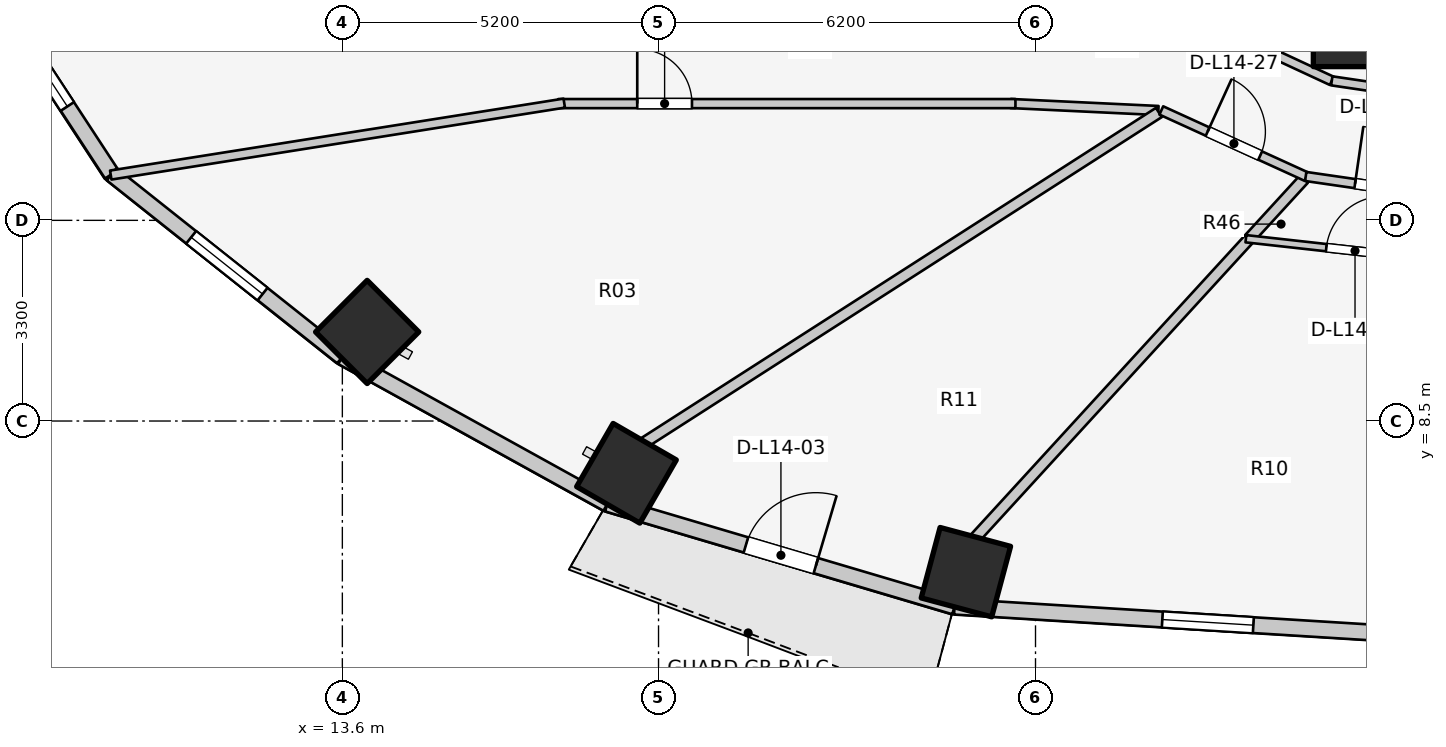
"""IFC4 building model, lengths in metres.
Left out: names, types, materials, properties, quantities, classifications, styles, units other than length and angle.
Written with IfcOpenShell. Run it as: python <this file> out.ifc"""

import sys

from ifc_helpers import new_model, si_unit, direction, frame, frame_2d, origin, origin_2d, place, context, subcontext, project, spatial, rectangle, extrude, element, fill, save


model = new_model("IFC4")
c1 = context("Model", 3, precision=1e-05, world=origin(), true_north=direction((0.0, 1.0)))
c2 = subcontext(c1, "Body", "Model", "MODEL_VIEW")
j1 = project(units=[si_unit("LENGTHUNIT", "METRE"), si_unit("PLANEANGLEUNIT", "RADIAN")], contexts=[c1])
p1 = place(None, origin())
s1 = spatial("IfcSite", under=j1, at=p1, CompositionType="ELEMENT")
p2 = place(p1, origin())
s2 = spatial("IfcBuilding", under=s1, at=p2, CompositionType="ELEMENT")
p3 = place(p2, frame((0.0, 0.0, 49.3)))
s3 = spatial("IfcBuildingStorey", under=s2, at=p3, CompositionType="ELEMENT", Elevation=49.3)
for number, where, z_axis, x_axis in (
    (1, (14.008, 9.965, 0.0), (0.0, 0.0, 1.0), (-0.707, -0.707, 0.0)),
    (2, (18.273, 7.641, 0.0), (0.0, 0.0, 1.0), (-0.5, -0.866, 0.0)),
):
    element("IfcColumn", number, at=place(p3, frame(where, z_axis=z_axis, x_axis=x_axis)), inside=s3, PredefinedType="COLUMN", context=c2, shape_type="SweptSolid", body=[
        extrude(rectangle(XDim=1.2, YDim=1.2, at=origin_2d()), origin(), (0.0, 0.0, 1.0), 3.1),
    ])
p4 = place(p3, frame((30.069, 14.828, 0.0), z_axis=(0.0, 0.0, 1.0), x_axis=(1.0, 0.0, 0.0)))
e3 = element("IfcColumn", 3, at=p4, inside=s3, PredefinedType="COLUMN", context=c2, shape_type="SweptSolid", body=[
    extrude(rectangle(XDim=1.0, YDim=1.0, at=origin_2d()), origin(), (0.0, 0.0, 1.0), 3.1),
])
p5 = place(p3, frame((23.855, 6.014, 0.0), z_axis=(0.0, 0.0, 1.0), x_axis=(-0.258819045103, -0.965925826289, 0.0)))
e4 = element("IfcColumn", 4, at=p5, inside=s3, PredefinedType="COLUMN", context=c2, shape_type="SweptSolid", body=[
    extrude(rectangle(XDim=1.2, YDim=1.2, at=origin_2d()), origin(), (0.0, 0.0, 1.0), 3.1),
])
p6 = place(p3, frame((7.033, 16.795, 0.0), z_axis=(0.0, 0.0, 1.0), x_axis=(0.547702757047, -0.836672988642, 0.0)))
e5 = element("IfcWall", 5, at=p6, inside=s3, PredefinedType="STANDARD", context=c2, shape_type="SweptSolid", body=[
    extrude(rectangle(XDim=5.062, YDim=0.26, at=frame_2d((2.531, 0.0))), origin(), (0.0, 0.0, 1.0), 2.85),
])
p7 = place(p6, frame((1.331, 0.0, 0.75)))
e6 = element("IfcOpeningElement", 6, at=p7, cuts=e5, PredefinedType="OPENING", context=c2, shape_type="SweptSolid", body=[
    extrude(rectangle(XDim=2.4, YDim=1.7, at=frame_2d((1.2, 0.85))), frame((0.0, 0.14, 0.0), z_axis=(0.0, -1.0, 0.0), x_axis=(1.0, 0.0, 0.0)), (0.0, 0.0, 1.0), 0.28),
])
p8 = place(p3, frame((9.806, 12.559, 0.0), z_axis=(0.0, 0.0, 1.0), x_axis=(0.783123133379, -0.621866672179, 0.0)))
e7 = element("IfcWall", 7, at=p8, inside=s3, PredefinedType="STANDARD", context=c2, shape_type="SweptSolid", body=[
    extrude(rectangle(XDim=4.839, YDim=0.26, at=frame_2d((2.419, 0.0))), origin(), (0.0, 0.0, 1.0), 2.85),
])
p9 = place(p8, frame((1.669, 0.0, 0.75)))
e8 = element("IfcOpeningElement", 8, at=p9, cuts=e7, PredefinedType="OPENING", context=c2, shape_type="SweptSolid", body=[
    extrude(rectangle(XDim=1.5, YDim=1.6, at=frame_2d((0.75, 0.8))), frame((0.0, 0.14, 0.0), z_axis=(0.0, -1.0, 0.0), x_axis=(1.0, 0.0, 0.0)), (0.0, 0.0, 1.0), 0.28),
])
p10 = place(p3, frame((13.595, 9.55, 0.0), z_axis=(0.0, 0.0, 1.0), x_axis=(0.875137303239, -0.483874674352, 0.0)))
e9 = element("IfcWall", 9, at=p10, inside=s3, PredefinedType="STANDARD", context=c2, shape_type="SweptSolid", body=[
    extrude(rectangle(XDim=4.985, YDim=0.26, at=frame_2d((2.493, 0.0))), origin(), (0.0, 0.0, 1.0), 2.85),
])
p11 = place(p3, frame((17.958, 7.138, 0.0), z_axis=(0.0, 0.0, 1.0), x_axis=(0.958843593522, -0.283934786811, 0.0)))
e10 = element("IfcWall", 10, at=p11, inside=s3, PredefinedType="STANDARD", context=c2, shape_type="SweptSolid", body=[
    extrude(rectangle(XDim=5.955, YDim=0.26, at=frame_2d((2.978, 0.0))), origin(), (0.0, 0.0, 1.0), 2.88),
])
p12 = place(p11, frame((2.378, 0.0, 0.0)))
e11 = element("IfcOpeningElement", 11, at=p12, cuts=e10, PredefinedType="OPENING", context=c2, shape_type="SweptSolid", body=[
    extrude(rectangle(XDim=1.2, YDim=2.2, at=frame_2d((0.6, 1.1))), frame((0.0, 0.14, 0.0), z_axis=(0.0, -1.0, 0.0), x_axis=(1.0, 0.0, 0.0)), (0.0, 0.0, 1.0), 0.28),
])
p13 = place(p3, frame((23.668, 5.447, 0.0), z_axis=(0.0, 0.0, 1.0), x_axis=(0.998090514779, -0.061768311519, 0.0)))
e12 = element("IfcWall", 12, at=p13, inside=s3, PredefinedType="STANDARD", context=c2, shape_type="SweptSolid", body=[
    extrude(rectangle(XDim=8.348, YDim=0.26, at=frame_2d((4.174, 0.0))), origin(), (0.0, 0.0, 1.0), 2.85),
])
p14 = place(p13, frame((3.424, 0.0, 0.75)))
e13 = element("IfcOpeningElement", 13, at=p14, cuts=e12, PredefinedType="OPENING", context=c2, shape_type="SweptSolid", body=[
    extrude(rectangle(XDim=1.5, YDim=1.6, at=frame_2d((0.75, 0.8))), frame((0.0, 0.14, 0.0), z_axis=(0.0, -1.0, 0.0), x_axis=(1.0, 0.0, 0.0)), (0.0, 0.0, 1.0), 0.28),
])
p15 = place(p3, frame((27.89, 15.015, 0.0), z_axis=(0.0, 0.0, 1.0), x_axis=(0.906943449489, -0.421252393975, 0.0)))
e14 = element("IfcWall", 14, at=p15, inside=s3, PredefinedType="PARTITIONING", context=c2, shape_type="SweptSolid", body=[
    extrude(rectangle(XDim=2.186, YDim=0.15, at=frame_2d((1.093, 0.0))), origin(), (0.0, 0.0, 1.0), 2.237),
])
p16 = place(p3, frame((29.873, 14.094, 0.0), z_axis=(0.0, 0.0, 1.0), x_axis=(0.989268584896, -0.146108408166, 0.0)))
e15 = element("IfcWall", 15, at=p16, inside=s3, PredefinedType="PARTITIONING", context=c2, shape_type="SweptSolid", body=[
    extrude(rectangle(XDim=2.151, YDim=0.15, at=frame_2d((1.075, 0.0))), origin(), (0.0, 0.0, 1.0), 2.237),
])
p17 = place(p3, frame((27.02, 13.606, 0.0), z_axis=(0.0, 0.0, 1.0), x_axis=(-0.998877427952, 0.047369651964, 0.0)))
e16 = element("IfcWall", 16, at=p17, inside=s3, PredefinedType="PARTITIONING", context=c2, shape_type="SweptSolid", body=[
    extrude(rectangle(XDim=2.433, YDim=0.15, at=frame_2d((1.216, 0.0))), origin(), (0.0, 0.0, 1.0), 2.237),
])
p18 = place(p3, frame((17.15, 13.72, 0.0), z_axis=(0.0, 0.0, 1.0), x_axis=(1.0, 0.0, 0.0)))
e17 = element("IfcWall", 17, at=p18, inside=s3, PredefinedType="PARTITIONING", context=c2, shape_type="SweptSolid", body=[
    extrude(rectangle(XDim=7.52, YDim=0.15, at=frame_2d((3.76, 0.0))), origin(), (0.0, 0.0, 1.0), 2.237),
])
p19 = place(p18, frame((1.3, 0.0, 0.0)))
e18 = element("IfcOpeningElement", 18, at=p19, cuts=e17, PredefinedType="OPENING", context=c2, shape_type="SweptSolid", body=[
    extrude(rectangle(XDim=0.9, YDim=2.1, at=frame_2d((0.45, 1.05))), frame((0.0, 0.085, 0.0), z_axis=(0.0, -1.0, 0.0), x_axis=(1.0, 0.0, 0.0)), (0.0, 0.0, 1.0), 0.17),
])
p20 = place(p3, frame((17.25, 13.728, 0.0), z_axis=(0.0, 0.0, 1.0), x_axis=(-0.987655781226, -0.156639898525, 0.0)))
e19 = element("IfcWall", 19, at=p20, inside=s3, PredefinedType="PARTITIONING", context=c2, shape_type="SweptSolid", body=[
    extrude(rectangle(XDim=7.552, YDim=0.15, at=frame_2d((3.776, 0.0))), origin(), (0.0, 0.0, 1.0), 2.069),
])
p21 = place(p3, frame((27.029, 13.574, 0.0), z_axis=(0.0, 0.0, 1.0), x_axis=(-0.841689919529, -0.5399611832, 0.0)))
e20 = element("IfcWall", 20, at=p21, inside=s3, PredefinedType="PARTITIONING", context=c2, shape_type="SweptSolid", body=[
    extrude(rectangle(XDim=10.058, YDim=0.18, at=frame_2d((5.029, 0.0))), origin(), (0.0, 0.0, 1.0), 2.237),
])
p22 = place(p3, frame((29.414, 12.479, 0.0), z_axis=(0.0, 0.0, 1.0), x_axis=(-0.675465011224, -0.737392038615, 0.0)))
e21 = element("IfcWall", 21, at=p22, inside=s3, PredefinedType="PARTITIONING", context=c2, shape_type="SweptSolid", body=[
    extrude(rectangle(XDim=8.007, YDim=0.18, at=frame_2d((4.003, 0.0))), origin(), (0.0, 0.0, 1.0), 2.237),
])
p23 = place(p3, frame((27.069, 13.607, 0.0), z_axis=(0.0, 0.0, 1.0), x_axis=(0.909747571199, -0.415161843982, 0.0)))
e22 = element("IfcWall", 22, at=p23, inside=s3, PredefinedType="PARTITIONING", context=c2, shape_type="SweptSolid", body=[
    extrude(rectangle(XDim=2.625, YDim=0.15, at=frame_2d((1.312, 0.0))), origin(), (0.0, 0.0, 1.0), 2.237),
])
p24 = place(p23, frame((0.838, 0.0, 0.0)))
e23 = element("IfcOpeningElement", 23, at=p24, cuts=e22, PredefinedType="OPENING", context=c2, shape_type="SweptSolid", body=[
    extrude(rectangle(XDim=0.95, YDim=2.1, at=frame_2d((0.475, 1.05))), frame((0.0, 0.085, 0.0), z_axis=(0.0, -1.0, 0.0), x_axis=(1.0, 0.0, 0.0)), (0.0, 0.0, 1.0), 0.17),
])
p25 = place(p3, frame((28.46, 11.498, 0.0), z_axis=(0.0, 0.0, 1.0), x_axis=(0.993882910401, -0.110438944277, 0.0)))
e24 = element("IfcWall", 24, at=p25, inside=s3, PredefinedType="MOVABLE", context=c2, shape_type="SweptSolid", body=[
    extrude(rectangle(XDim=3.612, YDim=0.12, at=frame_2d((1.806, 0.0))), origin(), (0.0, 0.0, 1.0), 2.237),
])
p26 = place(p25, frame((1.331, 0.0, 0.0)))
e25 = element("IfcOpeningElement", 25, at=p26, cuts=e24, PredefinedType="OPENING", context=c2, shape_type="SweptSolid", body=[
    extrude(rectangle(XDim=0.95, YDim=2.1, at=frame_2d((0.475, 1.05))), frame((0.0, 0.07, 0.0), z_axis=(0.0, -1.0, 0.0), x_axis=(1.0, 0.0, 0.0)), (0.0, 0.0, 1.0), 0.14),
])
p27 = place(p3, frame((29.444, 12.522, 0.0), z_axis=(0.0, 0.0, 1.0), x_axis=(0.989637894688, -0.143585644814, 0.0)))
e26 = element("IfcWall", 26, at=p27, inside=s3, PredefinedType="PARTITIONING", context=c2, shape_type="SweptSolid", body=[
    extrude(rectangle(XDim=2.59, YDim=0.15, at=frame_2d((1.295, 0.0))), origin(), (0.0, 0.0, 1.0), 2.237),
])
p28 = place(p27, frame((0.82, 0.0, 0.0)))
e27 = element("IfcOpeningElement", 27, at=p28, cuts=e26, PredefinedType="OPENING", context=c2, shape_type="SweptSolid", body=[
    extrude(rectangle(XDim=0.95, YDim=2.1, at=frame_2d((0.475, 1.05))), frame((0.0, 0.085, 0.0), z_axis=(0.0, -1.0, 0.0), x_axis=(1.0, 0.0, 0.0)), (0.0, 0.0, 1.0), 0.17),
])
p29 = place(p7, origin())
e28 = element("IfcWindow", 28, at=p29, inside=s3, PartitioningType="SINGLE_PANEL", PredefinedType="WINDOW", context=c2, shape_type="SweptSolid", body=[
    extrude(rectangle(XDim=2.4, YDim=1.7, at=frame_2d((1.2, 0.85))), frame((0.0, 0.03, 0.0), z_axis=(0.0, -1.0, 0.0), x_axis=(1.0, 0.0, 0.0)), (0.0, 0.0, 1.0), 0.06),
])
fill(e6, e28)
p30 = place(p9, origin())
e29 = element("IfcWindow", 29, at=p30, inside=s3, PartitioningType="SINGLE_PANEL", PredefinedType="WINDOW", context=c2, shape_type="SweptSolid", body=[
    extrude(rectangle(XDim=1.5, YDim=1.6, at=frame_2d((0.75, 0.8))), frame((0.0, 0.03, 0.0), z_axis=(0.0, -1.0, 0.0), x_axis=(1.0, 0.0, 0.0)), (0.0, 0.0, 1.0), 0.06),
])
fill(e8, e29)
p31 = place(p12, origin())
e30 = element("IfcDoor", 30, at=p31, inside=s3, OperationType="SINGLE_SWING_RIGHT", PredefinedType="DOOR", context=c2, shape_type="SweptSolid", body=[
    extrude(rectangle(XDim=1.2, YDim=2.2, at=frame_2d((0.6, 1.1))), frame((0.0, 0.025, 0.0), z_axis=(0.0, -1.0, 0.0), x_axis=(1.0, 0.0, 0.0)), (0.0, 0.0, 1.0), 0.05),
])
fill(e11, e30)
p32 = place(p14, origin())
e31 = element("IfcWindow", 31, at=p32, inside=s3, PartitioningType="SINGLE_PANEL", PredefinedType="WINDOW", context=c2, shape_type="SweptSolid", body=[
    extrude(rectangle(XDim=1.5, YDim=1.6, at=frame_2d((0.75, 0.8))), frame((0.0, 0.03, 0.0), z_axis=(0.0, -1.0, 0.0), x_axis=(1.0, 0.0, 0.0)), (0.0, 0.0, 1.0), 0.06),
])
fill(e13, e31)
p33 = place(p19, origin())
e32 = element("IfcDoor", 32, at=p33, inside=s3, OperationType="SINGLE_SWING_LEFT", PredefinedType="DOOR", context=c2, shape_type="SweptSolid", body=[
    extrude(rectangle(XDim=0.9, YDim=2.1, at=frame_2d((0.45, 1.05))), frame((0.0, 0.025, 0.0), z_axis=(0.0, -1.0, 0.0), x_axis=(1.0, 0.0, 0.0)), (0.0, 0.0, 1.0), 0.05),
])
fill(e18, e32)
p34 = place(p24, origin())
e33 = element("IfcDoor", 33, at=p34, inside=s3, OperationType="SINGLE_SWING_LEFT", PredefinedType="DOOR", context=c2, shape_type="SweptSolid", body=[
    extrude(rectangle(XDim=0.95, YDim=2.1, at=frame_2d((0.475, 1.05))), frame((0.0, 0.025, 0.0), z_axis=(0.0, -1.0, 0.0), x_axis=(1.0, 0.0, 0.0)), (0.0, 0.0, 1.0), 0.05),
])
fill(e23, e33)
p35 = place(p26, origin())
e34 = element("IfcDoor", 34, at=p35, inside=s3, OperationType="SINGLE_SWING_RIGHT", PredefinedType="DOOR", context=c2, shape_type="SweptSolid", body=[
    extrude(rectangle(XDim=0.95, YDim=2.1, at=frame_2d((0.475, 1.05))), frame((0.0, 0.025, 0.0), z_axis=(0.0, -1.0, 0.0), x_axis=(1.0, 0.0, 0.0)), (0.0, 0.0, 1.0), 0.05),
])
fill(e25, e34)
p36 = place(p28, origin())
e35 = element("IfcDoor", 35, at=p36, inside=s3, OperationType="SINGLE_SWING_LEFT", PredefinedType="DOOR", context=c2, shape_type="SweptSolid", body=[
    extrude(rectangle(XDim=0.95, YDim=2.1, at=frame_2d((0.475, 1.05))), frame((0.0, 0.025, 0.0), z_axis=(0.0, -1.0, 0.0), x_axis=(1.0, 0.0, 0.0)), (0.0, 0.0, 1.0), 0.05),
])
fill(e27, e35)
save(model, sys.argv[1])
